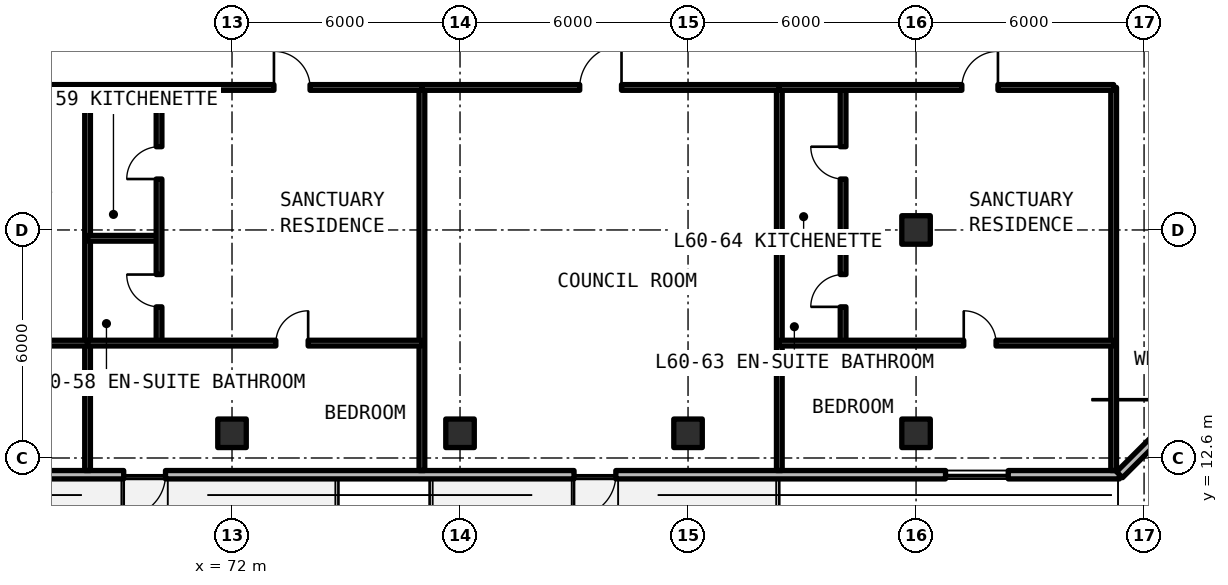
"""IFC4 building model, lengths in metres.
Left out: names, types, materials, properties, quantities, classifications, styles, units other than length and angle.
Written with IfcOpenShell. Run it as: python <this file> out.ifc"""

import sys

from ifc_helpers import new_model, si_unit, direction, frame, frame_2d, origin, origin_2d, place, context, subcontext, project, spatial, rectangle, extrude, element, fill, save


model = new_model("IFC4")
c1 = context("Model", 3, precision=1e-05, world=origin(), true_north=direction((0.0, 1.0)))
c2 = subcontext(c1, "Body", "Model", "MODEL_VIEW")
j1 = project(units=[si_unit("LENGTHUNIT", "METRE"), si_unit("PLANEANGLEUNIT", "RADIAN")], contexts=[c1])
p1 = place(None, origin())
s1 = spatial("IfcSite", under=j1, at=p1, CompositionType="ELEMENT")
p2 = place(p1, origin())
s2 = spatial("IfcBuilding", under=s1, at=p2, CompositionType="ELEMENT")
p3 = place(p2, frame((0.0, 0.0, 215.49)))
s3 = spatial("IfcBuildingStorey", under=s2, at=p3, CompositionType="ELEMENT", Elevation=215.49)
for number, where, z_axis, x_axis in (
    (1, (90.0, 18.6, 0.0), (0.0, 0.0, 1.0), (1.0, 0.0, 0.0)),
    (2, (72.0, 13.25, 0.0), (0.0, 0.0, 1.0), (1.0, 0.0, 0.0)),
    (3, (78.0, 13.25, 0.0), (0.0, 0.0, 1.0), (1.0, 0.0, 0.0)),
    (4, (84.0, 13.25, 0.0), (0.0, 0.0, 1.0), (1.0, 0.0, 0.0)),
    (5, (90.0, 13.25, 0.0), (0.0, 0.0, 1.0), (1.0, 0.0, 0.0)),
):
    element("IfcColumn", number, at=place(p3, frame(where, z_axis=z_axis, x_axis=x_axis)), inside=s3, PredefinedType="COLUMN", context=c2, shape_type="SweptSolid", body=[
        extrude(rectangle(XDim=0.75, YDim=0.75, at=origin_2d()), origin(), (0.0, 0.0, 1.0), 3.63),
    ])
p4 = place(p3, frame((52.11, 12.16, 0.0), z_axis=(0.0, 0.0, 1.0), x_axis=(1.0, 0.0, 0.0)))
e6 = element("IfcWall", 6, at=p4, inside=s3, PredefinedType="SOLIDWALL", context=c2, shape_type="SweptSolid", body=[
    extrude(rectangle(XDim=43.244, YDim=0.22, at=frame_2d((21.622, 0.0))), origin(), (0.0, 0.0, 1.0), 3.41),
])
p5 = place(p4, frame((4.94, 0.0, 0.0)))
e7 = element("IfcOpeningElement", 7, at=p5, cuts=e6, PredefinedType="OPENING", context=c2, shape_type="SweptSolid", body=[
    extrude(rectangle(XDim=1.1, YDim=2.15, at=frame_2d((0.55, 1.075))), frame((0.0, 0.12, 0.0), z_axis=(0.0, -1.0, 0.0), x_axis=(1.0, 0.0, 0.0)), (0.0, 0.0, 1.0), 0.24),
])
p6 = place(p4, frame((17.04, 0.0, 0.0)))
e8 = element("IfcOpeningElement", 8, at=p6, cuts=e6, PredefinedType="OPENING", context=c2, shape_type="SweptSolid", body=[
    extrude(rectangle(XDim=1.1, YDim=2.15, at=frame_2d((0.55, 1.075))), frame((0.0, 0.12, 0.0), z_axis=(0.0, -1.0, 0.0), x_axis=(1.0, 0.0, 0.0)), (0.0, 0.0, 1.0), 0.24),
])
p7 = place(p4, frame((28.89, 0.0, 0.0)))
e9 = element("IfcOpeningElement", 9, at=p7, cuts=e6, PredefinedType="OPENING", context=c2, shape_type="SweptSolid", body=[
    extrude(rectangle(XDim=1.1, YDim=2.15, at=frame_2d((0.55, 1.075))), frame((0.0, 0.12, 0.0), z_axis=(0.0, -1.0, 0.0), x_axis=(1.0, 0.0, 0.0)), (0.0, 0.0, 1.0), 0.24),
])
p8 = place(p4, frame((10.865, 0.0, 0.78)))
e10 = element("IfcOpeningElement", 10, at=p8, cuts=e6, PredefinedType="OPENING", context=c2, shape_type="SweptSolid", body=[
    extrude(rectangle(XDim=1.65, YDim=1.66, at=frame_2d((0.825, 0.83))), frame((0.0, 0.12, 0.0), z_axis=(0.0, -1.0, 0.0), x_axis=(1.0, 0.0, 0.0)), (0.0, 0.0, 1.0), 0.24),
])
p9 = place(p4, frame((38.666, 0.0, 0.78)))
e11 = element("IfcOpeningElement", 11, at=p9, cuts=e6, PredefinedType="OPENING", context=c2, shape_type="SweptSolid", body=[
    extrude(rectangle(XDim=1.65, YDim=1.66, at=frame_2d((0.825, 0.83))), frame((0.0, 0.12, 0.0), z_axis=(0.0, -1.0, 0.0), x_axis=(1.0, 0.0, 0.0)), (0.0, 0.0, 1.0), 0.24),
])
p10 = place(p3, frame((95.354, 12.16, 0.0), z_axis=(0.0, 0.0, 1.0), x_axis=(0.707085909342, 0.707127652415, 0.0)))
e12 = element("IfcWall", 12, at=p10, inside=s3, PredefinedType="SOLIDWALL", context=c2, shape_type="SweptSolid", body=[
    extrude(rectangle(XDim=5.849, YDim=0.22, at=frame_2d((2.924, 0.0))), origin(), (0.0, 0.0, 1.0), 3.41),
])
p11 = place(p10, frame((1.224, 0.0, 0.78)))
e13 = element("IfcOpeningElement", 13, at=p11, cuts=e12, PredefinedType="OPENING", context=c2, shape_type="SweptSolid", body=[
    extrude(rectangle(XDim=3.4, YDim=1.66, at=frame_2d((1.7, 0.83))), frame((0.0, 0.12, 0.0), z_axis=(0.0, -1.0, 0.0), x_axis=(1.0, 0.0, 0.0)), (0.0, 0.0, 1.0), 0.24),
])
for number, where, z_axis, x_axis in (
    (14, (95.2, 12.27, 0.0), (0.0, 0.0, 1.0), (0.0, 1.0, 0.0)),
    (15, (68.199, 12.27, 0.0), (0.0, 0.0, 1.0), (0.0, 1.0, 0.0)),
):
    element("IfcWall", number, at=place(p3, frame(where, z_axis=z_axis, x_axis=x_axis)), inside=s3, PredefinedType="SOLIDWALL", context=c2, shape_type="SweptSolid", body=[
        extrude(rectangle(XDim=10.08, YDim=0.15, at=frame_2d((5.04, 0.0))), origin(), (0.0, 0.0, 1.0), 2.63),
    ])
p12 = place(p3, frame((59.401, 15.623, 0.0), z_axis=(0.0, 0.0, 1.0), x_axis=(1.0, 0.0, 0.0)))
e16 = element("IfcWall", 16, at=p12, inside=s3, PredefinedType="PARTITIONING", context=c2, shape_type="SweptSolid", body=[
    extrude(rectangle(XDim=8.798, YDim=0.15, at=frame_2d((4.399, 0.0))), origin(), (0.0, 0.0, 1.0), 2.63),
])
p13 = place(p12, frame((5.273, 0.0, 0.0)))
e17 = element("IfcOpeningElement", 17, at=p13, cuts=e16, PredefinedType="OPENING", context=c2, shape_type="SweptSolid", body=[
    extrude(rectangle(XDim=0.85, YDim=2.1, at=frame_2d((0.425, 1.05))), frame((0.0, 0.085, 0.0), z_axis=(0.0, -1.0, 0.0), x_axis=(1.0, 0.0, 0.0)), (0.0, 0.0, 1.0), 0.17),
])
p14 = place(p3, frame((59.401, 22.35, 0.0), z_axis=(0.0, 0.0, 1.0), x_axis=(1.0, 0.0, 0.0)))
e18 = element("IfcWall", 18, at=p14, inside=s3, PredefinedType="SOLIDWALL", context=c2, shape_type="SweptSolid", body=[
    extrude(rectangle(XDim=8.798, YDim=0.15, at=frame_2d((4.399, 0.0))), origin(), (0.0, 0.0, 1.0), 2.63),
])
p15 = place(p14, frame((5.223, 0.0, 0.0)))
e19 = element("IfcOpeningElement", 19, at=p15, cuts=e18, PredefinedType="OPENING", context=c2, shape_type="SweptSolid", body=[
    extrude(rectangle(XDim=0.95, YDim=2.15, at=frame_2d((0.475, 1.075))), frame((0.0, 0.085, 0.0), z_axis=(0.0, -1.0, 0.0), x_axis=(1.0, 0.0, 0.0)), (0.0, 0.0, 1.0), 0.17),
])
p16 = place(p3, frame((76.997, 12.27, 0.0), z_axis=(0.0, 0.0, 1.0), x_axis=(0.0, 1.0, 0.0)))
e20 = element("IfcWall", 20, at=p16, inside=s3, PredefinedType="SOLIDWALL", context=c2, shape_type="SweptSolid", body=[
    extrude(rectangle(XDim=10.08, YDim=0.15, at=frame_2d((5.04, 0.0))), origin(), (0.0, 0.0, 1.0), 2.63),
])
p17 = place(p3, frame((68.199, 18.381, 0.0), z_axis=(0.0, 0.0, 1.0), x_axis=(1.0, 0.0, 0.0)))
e21 = element("IfcWall", 21, at=p17, inside=s3, PredefinedType="PARTITIONING", context=c2, shape_type="SweptSolid", body=[
    extrude(rectangle(XDim=1.881, YDim=0.15, at=frame_2d((0.94, 0.0))), origin(), (0.0, 0.0, 1.0), 2.63),
])
p18 = place(p3, frame((70.08, 15.623, 0.0), z_axis=(0.0, 0.0, 1.0), x_axis=(0.0, 1.0, 0.0)))
e22 = element("IfcWall", 22, at=p18, inside=s3, PredefinedType="PARTITIONING", context=c2, shape_type="SweptSolid", body=[
    extrude(rectangle(XDim=6.727, YDim=0.15, at=frame_2d((3.364, 0.0))), origin(), (0.0, 0.0, 1.0), 2.63),
])
p19 = place(p18, frame((0.954, 0.0, 0.0)))
e23 = element("IfcOpeningElement", 23, at=p19, cuts=e22, PredefinedType="OPENING", context=c2, shape_type="SweptSolid", body=[
    extrude(rectangle(XDim=0.85, YDim=2.1, at=frame_2d((0.425, 1.05))), frame((0.0, 0.085, 0.0), z_axis=(0.0, -1.0, 0.0), x_axis=(1.0, 0.0, 0.0)), (0.0, 0.0, 1.0), 0.17),
])
p20 = place(p18, frame((4.318, 0.0, 0.0)))
e24 = element("IfcOpeningElement", 24, at=p20, cuts=e22, PredefinedType="OPENING", context=c2, shape_type="SweptSolid", body=[
    extrude(rectangle(XDim=0.85, YDim=2.1, at=frame_2d((0.425, 1.05))), frame((0.0, 0.085, 0.0), z_axis=(0.0, -1.0, 0.0), x_axis=(1.0, 0.0, 0.0)), (0.0, 0.0, 1.0), 0.17),
])
p21 = place(p3, frame((68.199, 15.623, 0.0), z_axis=(0.0, 0.0, 1.0), x_axis=(1.0, 0.0, 0.0)))
e25 = element("IfcWall", 25, at=p21, inside=s3, PredefinedType="PARTITIONING", context=c2, shape_type="SweptSolid", body=[
    extrude(rectangle(XDim=8.798, YDim=0.15, at=frame_2d((4.399, 0.0))), origin(), (0.0, 0.0, 1.0), 2.63),
])
p22 = place(p21, frame((4.954, 0.0, 0.0)))
e26 = element("IfcOpeningElement", 26, at=p22, cuts=e25, PredefinedType="OPENING", context=c2, shape_type="SweptSolid", body=[
    extrude(rectangle(XDim=0.85, YDim=2.1, at=frame_2d((0.425, 1.05))), frame((0.0, 0.085, 0.0), z_axis=(0.0, -1.0, 0.0), x_axis=(1.0, 0.0, 0.0)), (0.0, 0.0, 1.0), 0.17),
])
p23 = place(p3, frame((68.199, 22.35, 0.0), z_axis=(0.0, 0.0, 1.0), x_axis=(1.0, 0.0, 0.0)))
e27 = element("IfcWall", 27, at=p23, inside=s3, PredefinedType="SOLIDWALL", context=c2, shape_type="SweptSolid", body=[
    extrude(rectangle(XDim=8.798, YDim=0.15, at=frame_2d((4.399, 0.0))), origin(), (0.0, 0.0, 1.0), 2.63),
])
p24 = place(p23, frame((4.904, 0.0, 0.0)))
e28 = element("IfcOpeningElement", 28, at=p24, cuts=e27, PredefinedType="OPENING", context=c2, shape_type="SweptSolid", body=[
    extrude(rectangle(XDim=0.95, YDim=2.15, at=frame_2d((0.475, 1.075))), frame((0.0, 0.085, 0.0), z_axis=(0.0, -1.0, 0.0), x_axis=(1.0, 0.0, 0.0)), (0.0, 0.0, 1.0), 0.17),
])
p25 = place(p3, frame((86.402, 12.27, 0.0), z_axis=(0.0, 0.0, 1.0), x_axis=(0.0, 1.0, 0.0)))
e29 = element("IfcWall", 29, at=p25, inside=s3, PredefinedType="SOLIDWALL", context=c2, shape_type="SweptSolid", body=[
    extrude(rectangle(XDim=10.08, YDim=0.15, at=frame_2d((5.04, 0.0))), origin(), (0.0, 0.0, 1.0), 2.63),
])
p26 = place(p3, frame((76.997, 22.35, 0.0), z_axis=(0.0, 0.0, 1.0), x_axis=(1.0, 0.0, 0.0)))
e30 = element("IfcWall", 30, at=p26, inside=s3, PredefinedType="SOLIDWALL", context=c2, shape_type="SweptSolid", body=[
    extrude(rectangle(XDim=9.405, YDim=0.15, at=frame_2d((4.702, 0.0))), origin(), (0.0, 0.0, 1.0), 2.63),
])
p27 = place(p26, frame((4.152, 0.0, 0.0)))
e31 = element("IfcOpeningElement", 31, at=p27, cuts=e30, PredefinedType="OPENING", context=c2, shape_type="SweptSolid", body=[
    extrude(rectangle(XDim=1.1, YDim=2.15, at=frame_2d((0.55, 1.075))), frame((0.0, 0.085, 0.0), z_axis=(0.0, -1.0, 0.0), x_axis=(1.0, 0.0, 0.0)), (0.0, 0.0, 1.0), 0.17),
])
p28 = place(p3, frame((86.402, 18.381, 0.0), z_axis=(0.0, 0.0, 1.0), x_axis=(1.0, 0.0, 0.0)))
e32 = element("IfcWall", 32, at=p28, inside=s3, PredefinedType="PARTITIONING", context=c2, shape_type="SweptSolid", body=[
    extrude(rectangle(XDim=1.678, YDim=0.15, at=frame_2d((0.839, 0.0))), origin(), (0.0, 0.0, 1.0), 2.63),
])
p29 = place(p3, frame((88.08, 15.623, 0.0), z_axis=(0.0, 0.0, 1.0), x_axis=(0.0, 1.0, 0.0)))
e33 = element("IfcWall", 33, at=p29, inside=s3, PredefinedType="PARTITIONING", context=c2, shape_type="SweptSolid", body=[
    extrude(rectangle(XDim=6.727, YDim=0.15, at=frame_2d((3.364, 0.0))), origin(), (0.0, 0.0, 1.0), 2.63),
])
p30 = place(p29, frame((0.954, 0.0, 0.0)))
e34 = element("IfcOpeningElement", 34, at=p30, cuts=e33, PredefinedType="OPENING", context=c2, shape_type="SweptSolid", body=[
    extrude(rectangle(XDim=0.85, YDim=2.1, at=frame_2d((0.425, 1.05))), frame((0.0, 0.085, 0.0), z_axis=(0.0, -1.0, 0.0), x_axis=(1.0, 0.0, 0.0)), (0.0, 0.0, 1.0), 0.17),
])
p31 = place(p29, frame((4.318, 0.0, 0.0)))
e35 = element("IfcOpeningElement", 35, at=p31, cuts=e33, PredefinedType="OPENING", context=c2, shape_type="SweptSolid", body=[
    extrude(rectangle(XDim=0.85, YDim=2.1, at=frame_2d((0.425, 1.05))), frame((0.0, 0.085, 0.0), z_axis=(0.0, -1.0, 0.0), x_axis=(1.0, 0.0, 0.0)), (0.0, 0.0, 1.0), 0.17),
])
p32 = place(p3, frame((86.402, 15.623, 0.0), z_axis=(0.0, 0.0, 1.0), x_axis=(1.0, 0.0, 0.0)))
e36 = element("IfcWall", 36, at=p32, inside=s3, PredefinedType="PARTITIONING", context=c2, shape_type="SweptSolid", body=[
    extrude(rectangle(XDim=8.798, YDim=0.15, at=frame_2d((4.399, 0.0))), origin(), (0.0, 0.0, 1.0), 2.63),
])
p33 = place(p32, frame((4.853, 0.0, 0.0)))
e37 = element("IfcOpeningElement", 37, at=p33, cuts=e36, PredefinedType="OPENING", context=c2, shape_type="SweptSolid", body=[
    extrude(rectangle(XDim=0.85, YDim=2.1, at=frame_2d((0.425, 1.05))), frame((0.0, 0.085, 0.0), z_axis=(0.0, -1.0, 0.0), x_axis=(1.0, 0.0, 0.0)), (0.0, 0.0, 1.0), 0.17),
])
p34 = place(p3, frame((86.402, 22.35, 0.0), z_axis=(0.0, 0.0, 1.0), x_axis=(1.0, 0.0, 0.0)))
e38 = element("IfcWall", 38, at=p34, inside=s3, PredefinedType="SOLIDWALL", context=c2, shape_type="SweptSolid", body=[
    extrude(rectangle(XDim=8.798, YDim=0.15, at=frame_2d((4.399, 0.0))), origin(), (0.0, 0.0, 1.0), 2.63),
])
p35 = place(p34, frame((4.803, 0.0, 0.0)))
e39 = element("IfcOpeningElement", 39, at=p35, cuts=e38, PredefinedType="OPENING", context=c2, shape_type="SweptSolid", body=[
    extrude(rectangle(XDim=0.95, YDim=2.15, at=frame_2d((0.475, 1.075))), frame((0.0, 0.085, 0.0), z_axis=(0.0, -1.0, 0.0), x_axis=(1.0, 0.0, 0.0)), (0.0, 0.0, 1.0), 0.17),
])
p36 = place(p6, frame((1.1, 0.0, 0.0), z_axis=(0.0, 0.0, 1.0), x_axis=(-1.0, 0.0, 0.0)))
e40 = element("IfcDoor", 40, at=p36, inside=s3, OperationType="SINGLE_SWING_LEFT", PredefinedType="DOOR", context=c2, shape_type="SweptSolid", body=[
    extrude(rectangle(XDim=1.1, YDim=2.15, at=frame_2d((0.55, 1.075))), frame((0.0, 0.025, 0.0), z_axis=(0.0, -1.0, 0.0), x_axis=(1.0, 0.0, 0.0)), (0.0, 0.0, 1.0), 0.05),
])
fill(e8, e40)
p37 = place(p7, frame((1.1, 0.0, 0.0), z_axis=(0.0, 0.0, 1.0), x_axis=(-1.0, 0.0, 0.0)))
e41 = element("IfcDoor", 41, at=p37, inside=s3, OperationType="SINGLE_SWING_RIGHT", PredefinedType="DOOR", context=c2, shape_type="SweptSolid", body=[
    extrude(rectangle(XDim=1.1, YDim=2.15, at=frame_2d((0.55, 1.075))), frame((0.0, 0.025, 0.0), z_axis=(0.0, -1.0, 0.0), x_axis=(1.0, 0.0, 0.0)), (0.0, 0.0, 1.0), 0.05),
])
fill(e9, e41)
p38 = place(p9, origin())
e42 = element("IfcWindow", 42, at=p38, inside=s3, PartitioningType="SINGLE_PANEL", PredefinedType="WINDOW", context=c2, shape_type="SweptSolid", body=[
    extrude(rectangle(XDim=1.65, YDim=1.66, at=frame_2d((0.825, 0.83))), frame((0.0, 0.03, 0.0), z_axis=(0.0, -1.0, 0.0), x_axis=(1.0, 0.0, 0.0)), (0.0, 0.0, 1.0), 0.06),
])
fill(e11, e42)
p39 = place(p19, origin())
e43 = element("IfcDoor", 43, at=p39, inside=s3, OperationType="SINGLE_SWING_RIGHT", PredefinedType="DOOR", context=c2, shape_type="SweptSolid", body=[
    extrude(rectangle(XDim=0.85, YDim=2.1, at=frame_2d((0.425, 1.05))), frame((0.0, 0.025, 0.0), z_axis=(0.0, -1.0, 0.0), x_axis=(1.0, 0.0, 0.0)), (0.0, 0.0, 1.0), 0.05),
])
fill(e23, e43)
p40 = place(p20, origin())
e44 = element("IfcDoor", 44, at=p40, inside=s3, OperationType="SINGLE_SWING_LEFT", PredefinedType="DOOR", context=c2, shape_type="SweptSolid", body=[
    extrude(rectangle(XDim=0.85, YDim=2.1, at=frame_2d((0.425, 1.05))), frame((0.0, 0.025, 0.0), z_axis=(0.0, -1.0, 0.0), x_axis=(1.0, 0.0, 0.0)), (0.0, 0.0, 1.0), 0.05),
])
fill(e24, e44)
p41 = place(p22, origin())
e45 = element("IfcDoor", 45, at=p41, inside=s3, OperationType="SINGLE_SWING_RIGHT", PredefinedType="DOOR", context=c2, shape_type="SweptSolid", body=[
    extrude(rectangle(XDim=0.85, YDim=2.1, at=frame_2d((0.425, 1.05))), frame((0.0, 0.025, 0.0), z_axis=(0.0, -1.0, 0.0), x_axis=(1.0, 0.0, 0.0)), (0.0, 0.0, 1.0), 0.05),
])
fill(e26, e45)
p42 = place(p24, origin())
e46 = element("IfcDoor", 46, at=p42, inside=s3, OperationType="SINGLE_SWING_LEFT", PredefinedType="DOOR", context=c2, shape_type="SweptSolid", body=[
    extrude(rectangle(XDim=0.95, YDim=2.15, at=frame_2d((0.475, 1.075))), frame((0.0, 0.025, 0.0), z_axis=(0.0, -1.0, 0.0), x_axis=(1.0, 0.0, 0.0)), (0.0, 0.0, 1.0), 0.05),
])
fill(e28, e46)
p43 = place(p27, origin())
e47 = element("IfcDoor", 47, at=p43, inside=s3, OperationType="SINGLE_SWING_RIGHT", PredefinedType="DOOR", context=c2, shape_type="SweptSolid", body=[
    extrude(rectangle(XDim=1.1, YDim=2.15, at=frame_2d((0.55, 1.075))), frame((0.0, 0.025, 0.0), z_axis=(0.0, -1.0, 0.0), x_axis=(1.0, 0.0, 0.0)), (0.0, 0.0, 1.0), 0.05),
])
fill(e31, e47)
p44 = place(p30, origin())
e48 = element("IfcDoor", 48, at=p44, inside=s3, OperationType="SINGLE_SWING_LEFT", PredefinedType="DOOR", context=c2, shape_type="SweptSolid", body=[
    extrude(rectangle(XDim=0.85, YDim=2.1, at=frame_2d((0.425, 1.05))), frame((0.0, 0.025, 0.0), z_axis=(0.0, -1.0, 0.0), x_axis=(1.0, 0.0, 0.0)), (0.0, 0.0, 1.0), 0.05),
])
fill(e34, e48)
p45 = place(p31, origin())
e49 = element("IfcDoor", 49, at=p45, inside=s3, OperationType="SINGLE_SWING_RIGHT", PredefinedType="DOOR", context=c2, shape_type="SweptSolid", body=[
    extrude(rectangle(XDim=0.85, YDim=2.1, at=frame_2d((0.425, 1.05))), frame((0.0, 0.025, 0.0), z_axis=(0.0, -1.0, 0.0), x_axis=(1.0, 0.0, 0.0)), (0.0, 0.0, 1.0), 0.05),
])
fill(e35, e49)
p46 = place(p33, origin())
e50 = element("IfcDoor", 50, at=p46, inside=s3, OperationType="SINGLE_SWING_LEFT", PredefinedType="DOOR", context=c2, shape_type="SweptSolid", body=[
    extrude(rectangle(XDim=0.85, YDim=2.1, at=frame_2d((0.425, 1.05))), frame((0.0, 0.025, 0.0), z_axis=(0.0, -1.0, 0.0), x_axis=(1.0, 0.0, 0.0)), (0.0, 0.0, 1.0), 0.05),
])
fill(e37, e50)
p47 = place(p35, origin())
e51 = element("IfcDoor", 51, at=p47, inside=s3, OperationType="SINGLE_SWING_RIGHT", PredefinedType="DOOR", context=c2, shape_type="SweptSolid", body=[
    extrude(rectangle(XDim=0.95, YDim=2.15, at=frame_2d((0.475, 1.075))), frame((0.0, 0.025, 0.0), z_axis=(0.0, -1.0, 0.0), x_axis=(1.0, 0.0, 0.0)), (0.0, 0.0, 1.0), 0.05),
])
fill(e39, e51)
save(model, sys.argv[1])
